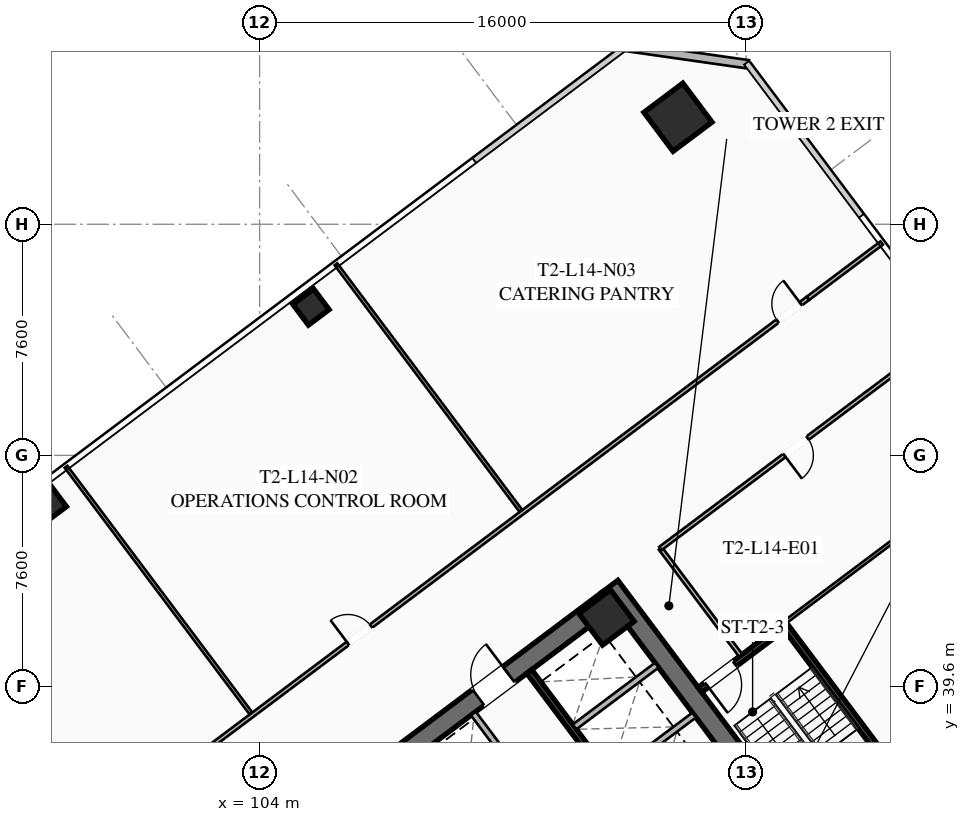
"""IFC4 building model, lengths in metres.
Left out: names, types, materials, properties, quantities, classifications, styles, units other than length and angle.
Written with IfcOpenShell. Run it as: python <this file> out.ifc"""

import sys

from ifc_helpers import new_model, si_unit, direction, frame, frame_2d, origin, origin_2d, place, context, subcontext, project, spatial, rectangle, hollow_rectangle, extrude, element, fill, save


model = new_model("IFC4")
c1 = context("Model", 3, precision=1e-05, world=origin(), true_north=direction((0.0, 1.0)))
c2 = subcontext(c1, "Body", "Model", "MODEL_VIEW")
j1 = project(units=[si_unit("LENGTHUNIT", "METRE"), si_unit("PLANEANGLEUNIT", "RADIAN")], contexts=[c1])
p1 = place(None, origin())
s1 = spatial("IfcSite", under=j1, at=p1, CompositionType="ELEMENT")
p2 = place(p1, origin())
s2 = spatial("IfcBuilding", under=s1, at=p2, CompositionType="ELEMENT")
p3 = place(p2, frame((0.0, 0.0, 56.55)))
s3 = spatial("IfcBuildingStorey", under=s2, at=p3, CompositionType="ELEMENT", Elevation=56.55)
p4 = place(p3, frame((115.524, 42.893, 0.0), z_axis=(0.0, 0.0, 1.0), x_axis=(0.600005007985, -0.799996243986, 0.0)))
e1 = element("IfcWall", 1, at=p4, inside=s3, PredefinedType="SHEAR", context=c2, shape_type="SweptSolid", body=[
    extrude(rectangle(XDim=15.6, YDim=0.65, at=frame_2d((7.8, 0.0))), origin(), (0.0, 0.0, 1.0), 3.55),
])
p5 = place(p3, frame((103.571, 33.522, 0.0), z_axis=(0.0, 0.0, 1.0), x_axis=(0.799998028465, 0.600002628705, 0.0)))
e2 = element("IfcWall", 2, at=p5, inside=s3, PredefinedType="SHEAR", context=c2, shape_type="SweptSolid", body=[
    extrude(rectangle(XDim=14.86, YDim=0.65, at=frame_2d((7.43, 0.0))), origin(), (0.0, 0.0, 1.0), 3.55),
])
p6 = place(p5, frame((4.48, 0.0, 0.0)))
e3 = element("IfcOpeningElement", 3, at=p6, cuts=e2, PredefinedType="OPENING", context=c2, shape_type="SweptSolid", body=[
    extrude(rectangle(XDim=1.25, YDim=2.25, at=frame_2d((0.625, 1.125))), frame((0.0, 0.335, 0.0), z_axis=(0.0, -1.0, 0.0), x_axis=(1.0, 0.0, 0.0)), (0.0, 0.0, 1.0), 0.67),
])
p7 = place(p5, frame((9.53, 0.0, 0.0)))
e4 = element("IfcOpeningElement", 4, at=p7, cuts=e2, PredefinedType="OPENING", context=c2, shape_type="SweptSolid", body=[
    extrude(rectangle(XDim=1.25, YDim=2.25, at=frame_2d((0.625, 1.125))), frame((0.0, 0.335, 0.0), z_axis=(0.0, -1.0, 0.0), x_axis=(1.0, 0.0, 0.0)), (0.0, 0.0, 1.0), 0.67),
])
p8 = place(p3, frame((115.41, 41.87, 0.0), z_axis=(0.0, 0.0, 1.0), x_axis=(0.799999996291, 0.600000004945, 0.0)))
e5 = element("IfcColumn", 5, at=p8, inside=s3, PredefinedType="COLUMN", context=c2, shape_type="SweptSolid", body=[
    extrude(hollow_rectangle(XDim=1.3, YDim=1.3, WallThickness=0.05, at=origin_2d()), origin(), (0.0, 0.0, 1.0), 3.35),
])
p9 = place(p3, frame((117.76, 58.32, 0.0), z_axis=(0.0, 0.0, 1.0), x_axis=(0.799999996291, 0.600000004945, 0.0)))
e6 = element("IfcColumn", 6, at=p9, inside=s3, PredefinedType="COLUMN", context=c2, shape_type="SweptSolid", body=[
    extrude(hollow_rectangle(XDim=1.6, YDim=1.6, WallThickness=0.06, at=origin_2d()), origin(), (0.0, 0.0, 1.0), 3.35),
])
for number, where, z_axis, x_axis in (
    (7, (105.69, 52.08, 0.0), (0.0, 0.0, 1.0), (0.8, 0.6, 0.0)),
    (8, (97.05, 45.6, 0.0), (0.0, 0.0, 1.0), (0.8, 0.6, 0.0)),
):
    element("IfcColumn", number, at=place(p3, frame(where, z_axis=z_axis, x_axis=x_axis)), inside=s3, PredefinedType="COLUMN", context=c2, shape_type="SweptSolid", body=[
        extrude(hollow_rectangle(XDim=0.85, YDim=0.85, WallThickness=0.035, at=origin_2d()), origin(), (0.0, 0.0, 1.0), 3.35),
    ])
p10 = place(p3, frame((116.02, 60.64, 0.0), z_axis=(0.0, 0.0, 1.0), x_axis=(0.989955445613, -0.14137968631, 0.0)))
e9 = element("IfcWall", 9, at=p10, inside=s3, PredefinedType="SOLIDWALL", context=c2, shape_type="SweptSolid", body=[
    extrude(rectangle(XDim=4.101, YDim=0.28, at=frame_2d((2.051, 0.0))), origin(), (0.0, 0.0, 1.0), 3.35),
])
p11 = place(p3, frame((112.87, 40.09, 0.0), z_axis=(0.0, 0.0, 1.0), x_axis=(0.599975393228, -0.800018454488, 0.0)))
e10 = element("IfcWall", 10, at=p11, inside=s3, PredefinedType="SHEAR", context=c2, shape_type="SweptSolid", body=[
    extrude(rectangle(XDim=6.35, YDim=0.2, at=frame_2d((3.175, 0.0))), origin(), (0.0, 0.0, 1.0), 3.35),
])
for number, where, z_axis, x_axis in (
    (11, (115.59, 36.63, 0.0), (0.0, 0.0, 1.0), (0.8, 0.6, 0.0)),
    (12, (114.36, 38.27, 0.0), (0.0, 0.0, 1.0), (0.8, 0.6, 0.0)),
):
    element("IfcWall", number, at=place(p3, frame(where, z_axis=z_axis, x_axis=x_axis)), inside=s3, PredefinedType="SOLIDWALL", context=c2, shape_type="SweptSolid", body=[
        extrude(rectangle(XDim=3.38, YDim=0.2, at=frame_2d((1.69, 0.0))), origin(), (0.0, 0.0, 1.0), 3.35),
    ])
p12 = place(p3, frame((115.11, 33.27, 0.0), z_axis=(0.0, 0.0, 1.0), x_axis=(-0.600011488909, 0.79999138319, 0.0)))
e13 = element("IfcWall", 13, at=p12, inside=s3, PredefinedType="SOLIDWALL", context=c2, shape_type="SweptSolid", body=[
    extrude(rectangle(XDim=6.8, YDim=0.2, at=frame_2d((3.4, 0.0))), origin(), (0.0, 0.0, 1.0), 3.35),
])
p13 = place(p3, frame((125.304, 36.228, 0.0), z_axis=(0.0, 0.0, 1.0), x_axis=(-0.59998851072, 0.800008616831, 0.0)))
e14 = element("IfcWall", 14, at=p13, inside=s3, PredefinedType="SHEAR", context=c2, shape_type="SweptSolid", body=[
    extrude(rectangle(XDim=6.8, YDim=0.2, at=frame_2d((3.4, 0.0))), origin(), (0.0, 0.0, 1.0), 3.35),
])
p14 = place(p3, frame((121.204, 41.528, 0.0), z_axis=(0.0, 0.0, 1.0), x_axis=(-0.800017232136, -0.599977023131, 0.0)))
e15 = element("IfcWall", 15, at=p14, inside=s3, PredefinedType="SHEAR", context=c2, shape_type="SweptSolid", body=[
    extrude(rectangle(XDim=3.4, YDim=0.2, at=frame_2d((1.7, 0.0))), origin(), (0.0, 0.0, 1.0), 3.35),
])
p15 = place(p14, frame((1.975, 0.0, 0.0)))
e16 = element("IfcOpeningElement", 16, at=p15, cuts=e15, PredefinedType="OPENING", context=c2, shape_type="SweptSolid", body=[
    extrude(rectangle(XDim=1.15, YDim=2.2, at=frame_2d((0.575, 1.1))), frame((0.0, 0.11, 0.0), z_axis=(0.0, -1.0, 0.0), x_axis=(1.0, 0.0, 0.0)), (0.0, 0.0, 1.0), 0.22),
])
p16 = place(p3, frame((119.824, 40.618, 0.0), z_axis=(0.0, 0.0, 1.0), x_axis=(-0.599982243973, 0.800013316712, 0.0)))
e17 = element("IfcWall", 17, at=p16, inside=s3, PredefinedType="PARTITIONING", context=c2, shape_type="SweptSolid", body=[
    extrude(rectangle(XDim=4.4, YDim=0.135, at=frame_2d((2.2, 0.0))), origin(), (0.0, 0.0, 1.0), 2.703),
])
p17 = place(p3, frame((98.174, 34.468, 0.0), z_axis=(0.0, 0.0, 1.0), x_axis=(0.800000982127, 0.599998690494, 0.0)))
e18 = element("IfcWall", 18, at=p17, inside=s3, PredefinedType="PARTITIONING", context=c2, shape_type="SweptSolid", body=[
    extrude(rectangle(XDim=29.83, YDim=0.135, at=frame_2d((14.915, 0.0))), origin(), (0.0, 0.0, 1.0), 2.703),
])
p18 = place(p17, frame((0.3, 0.0, 0.0)))
e19 = element("IfcOpeningElement", 19, at=p18, cuts=e18, PredefinedType="OPENING", context=c2, shape_type="SweptSolid", body=[
    extrude(rectangle(XDim=0.95, YDim=2.05, at=frame_2d((0.475, 1.025))), frame((0.0, 0.077, 0.0), z_axis=(0.0, -1.0, 0.0), x_axis=(1.0, 0.0, 0.0)), (0.0, 0.0, 1.0), 0.155),
])
p19 = place(p17, frame((10.913, 0.0, 0.0)))
e20 = element("IfcOpeningElement", 20, at=p19, cuts=e18, PredefinedType="OPENING", context=c2, shape_type="SweptSolid", body=[
    extrude(rectangle(XDim=0.95, YDim=2.05, at=frame_2d((0.475, 1.025))), frame((0.0, 0.077, 0.0), z_axis=(0.0, -1.0, 0.0), x_axis=(1.0, 0.0, 0.0)), (0.0, 0.0, 1.0), 0.155),
])
p20 = place(p17, frame((28.58, 0.0, 0.0)))
e21 = element("IfcOpeningElement", 21, at=p20, cuts=e18, PredefinedType="OPENING", context=c2, shape_type="SweptSolid", body=[
    extrude(rectangle(XDim=0.95, YDim=2.05, at=frame_2d((0.475, 1.025))), frame((0.0, 0.077, 0.0), z_axis=(0.0, -1.0, 0.0), x_axis=(1.0, 0.0, 0.0)), (0.0, 0.0, 1.0), 0.155),
])
p21 = place(p3, frame((122.038, 52.366, 0.0), z_axis=(0.0, 0.0, 1.0), x_axis=(0.799961321723, 0.600051567574, 0.0)))
e22 = element("IfcWall", 22, at=p21, inside=s3, PredefinedType="PARTITIONING", context=c2, shape_type="SweptSolid", body=[
    extrude(rectangle(XDim=3.03, YDim=0.135, at=frame_2d((1.515, 0.0))), origin(), (0.0, 0.0, 1.0), 2.703),
])
p22 = place(p3, frame((103.71, 38.72, 0.0), z_axis=(0.0, 0.0, 1.0), x_axis=(-0.599992287679, 0.800005784183, 0.0)))
e23 = element("IfcWall", 23, at=p22, inside=s3, PredefinedType="PARTITIONING", context=c2, shape_type="SweptSolid", body=[
    extrude(rectangle(XDim=10.13, YDim=0.11, at=frame_2d((5.065, 0.0))), origin(), (0.0, 0.0, 1.0), 2.703),
])
p23 = place(p3, frame((112.59, 45.38, 0.0), z_axis=(0.0, 0.0, 1.0), x_axis=(-0.600007712154, 0.799994215827, 0.0)))
e24 = element("IfcWall", 24, at=p23, inside=s3, PredefinedType="PARTITIONING", context=c2, shape_type="SweptSolid", body=[
    extrude(rectangle(XDim=10.13, YDim=0.11, at=frame_2d((5.065, 0.0))), origin(), (0.0, 0.0, 1.0), 2.703),
])
p24 = place(p3, frame((126.664, 51.248, 0.0), z_axis=(0.0, 0.0, 1.0), x_axis=(-0.799995055373, -0.600006592779, 0.0)))
e25 = element("IfcWall", 25, at=p24, inside=s3, PredefinedType="PARTITIONING", context=c2, shape_type="SweptSolid", body=[
    extrude(rectangle(XDim=11.85, YDim=0.135, at=frame_2d((5.925, 0.0))), origin(), (0.0, 0.0, 1.0), 2.703),
])
p25 = place(p24, frame((5.8, 0.0, 0.0)))
e26 = element("IfcOpeningElement", 26, at=p25, cuts=e25, PredefinedType="OPENING", context=c2, shape_type="SweptSolid", body=[
    extrude(rectangle(XDim=0.95, YDim=2.05, at=frame_2d((0.475, 1.025))), frame((0.0, 0.077, 0.0), z_axis=(0.0, -1.0, 0.0), x_axis=(1.0, 0.0, 0.0)), (0.0, 0.0, 1.0), 0.155),
])
p26 = place(p3, frame((129.304, 47.728, 0.0), z_axis=(0.0, 0.0, 1.0), x_axis=(-0.8, -0.6, 0.0)))
e27 = element("IfcWall", 27, at=p26, inside=s3, PredefinedType="PARTITIONING", context=c2, shape_type="SweptSolid", body=[
    extrude(rectangle(XDim=10.0, YDim=0.11, at=frame_2d((5.0, 0.0))), origin(), (0.0, 0.0, 1.0), 2.703),
])
p27 = place(p7, origin())
e28 = element("IfcDoor", 28, at=p27, inside=s3, OperationType="SINGLE_SWING_RIGHT", PredefinedType="DOOR", context=c2, shape_type="SweptSolid", body=[
    extrude(rectangle(XDim=1.25, YDim=2.25, at=frame_2d((0.625, 1.125))), frame((0.0, 0.025, 0.0), z_axis=(0.0, -1.0, 0.0), x_axis=(1.0, 0.0, 0.0)), (0.0, 0.0, 1.0), 0.05),
])
fill(e4, e28)
p28 = place(p15, origin())
e29 = element("IfcDoor", 29, at=p28, inside=s3, OperationType="SINGLE_SWING_RIGHT", PredefinedType="DOOR", context=c2, shape_type="SweptSolid", body=[
    extrude(rectangle(XDim=1.15, YDim=2.2, at=frame_2d((0.575, 1.1))), frame((0.0, 0.025, 0.0), z_axis=(0.0, -1.0, 0.0), x_axis=(1.0, 0.0, 0.0)), (0.0, 0.0, 1.0), 0.05),
])
fill(e16, e29)
p29 = place(p19, origin())
e30 = element("IfcDoor", 30, at=p29, inside=s3, OperationType="SINGLE_SWING_LEFT", PredefinedType="DOOR", context=c2, shape_type="SweptSolid", body=[
    extrude(rectangle(XDim=0.95, YDim=2.05, at=frame_2d((0.475, 1.025))), frame((0.0, 0.025, 0.0), z_axis=(0.0, -1.0, 0.0), x_axis=(1.0, 0.0, 0.0)), (0.0, 0.0, 1.0), 0.05),
])
fill(e20, e30)
p30 = place(p20, origin())
e31 = element("IfcDoor", 31, at=p30, inside=s3, OperationType="SINGLE_SWING_RIGHT", PredefinedType="DOOR", context=c2, shape_type="SweptSolid", body=[
    extrude(rectangle(XDim=0.95, YDim=2.05, at=frame_2d((0.475, 1.025))), frame((0.0, 0.025, 0.0), z_axis=(0.0, -1.0, 0.0), x_axis=(1.0, 0.0, 0.0)), (0.0, 0.0, 1.0), 0.05),
])
fill(e21, e31)
p31 = place(p25, origin())
e32 = element("IfcDoor", 32, at=p31, inside=s3, OperationType="SINGLE_SWING_RIGHT", PredefinedType="DOOR", context=c2, shape_type="SweptSolid", body=[
    extrude(rectangle(XDim=0.95, YDim=2.05, at=frame_2d((0.475, 1.025))), frame((0.0, 0.025, 0.0), z_axis=(0.0, -1.0, 0.0), x_axis=(1.0, 0.0, 0.0)), (0.0, 0.0, 1.0), 0.05),
])
fill(e26, e32)
save(model, sys.argv[1])
